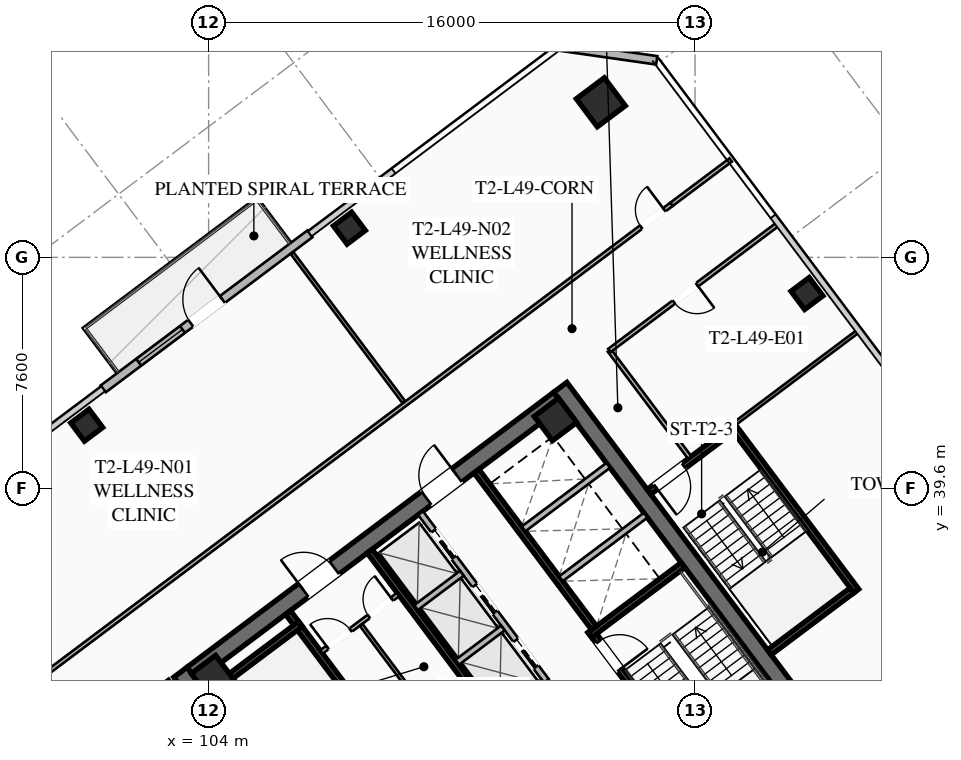
"""IFC4 building model, lengths in metres.
Left out: names, types, materials, properties, quantities, classifications, styles, units other than length and angle.
Written with IfcOpenShell. Run it as: python <this file> out.ifc"""

import sys

from ifc_helpers import new_model, si_unit, direction, frame, frame_2d, origin, origin_2d, place, context, subcontext, project, spatial, rectangle, hollow_rectangle, extrude, element, fill, save


model = new_model("IFC4")
c1 = context("Model", 3, precision=1e-05, world=origin(), true_north=direction((0.0, 1.0)))
c2 = subcontext(c1, "Body", "Model", "MODEL_VIEW")
j1 = project(units=[si_unit("LENGTHUNIT", "METRE"), si_unit("PLANEANGLEUNIT", "RADIAN")], contexts=[c1])
p1 = place(None, origin())
s1 = spatial("IfcSite", under=j1, at=p1, CompositionType="ELEMENT")
p2 = place(p1, origin())
s2 = spatial("IfcBuilding", under=s1, at=p2, CompositionType="ELEMENT")
p3 = place(p2, frame((0.0, 0.0, 181.85)))
s3 = spatial("IfcBuildingStorey", under=s2, at=p3, CompositionType="ELEMENT", Elevation=181.85)
for number, where, z_axis, x_axis in (
    (1, (112.436, 21.077, 0.0), (0.0, 0.0, 1.0), (-0.6, 0.8, 0.0)),
    (2, (115.564, 42.923, 0.0), (0.0, 0.0, 1.0), (0.6, -0.8, 0.0)),
):
    element("IfcWall", number, at=place(p3, frame(where, z_axis=z_axis, x_axis=x_axis)), inside=s3, PredefinedType="SHEAR", context=c2, shape_type="SweptSolid", body=[
        extrude(rectangle(XDim=15.6, YDim=0.55, at=frame_2d((7.8, 0.0))), origin(), (0.0, 0.0, 1.0), 3.55),
    ])
p4 = place(p3, frame((103.461, 33.502, 0.0), z_axis=(0.0, 0.0, 1.0), x_axis=(0.799998054672, 0.600002593761, 0.0)))
e3 = element("IfcWall", 3, at=p4, inside=s3, PredefinedType="SHEAR", context=c2, shape_type="SweptSolid", body=[
    extrude(rectangle(XDim=15.06, YDim=0.55, at=frame_2d((7.53, 0.0))), origin(), (0.0, 0.0, 1.0), 3.55),
])
p5 = place(p4, frame((4.58, 0.0, 0.0)))
e4 = element("IfcOpeningElement", 4, at=p5, cuts=e3, PredefinedType="OPENING", context=c2, shape_type="SweptSolid", body=[
    extrude(rectangle(XDim=1.25, YDim=2.25, at=frame_2d((0.625, 1.125))), frame((0.0, 0.285, 0.0), z_axis=(0.0, -1.0, 0.0), x_axis=(1.0, 0.0, 0.0)), (0.0, 0.0, 1.0), 0.57),
])
p6 = place(p4, frame((9.63, 0.0, 0.0)))
e5 = element("IfcOpeningElement", 5, at=p6, cuts=e3, PredefinedType="OPENING", context=c2, shape_type="SweptSolid", body=[
    extrude(rectangle(XDim=1.25, YDim=2.25, at=frame_2d((0.625, 1.125))), frame((0.0, 0.285, 0.0), z_axis=(0.0, -1.0, 0.0), x_axis=(1.0, 0.0, 0.0)), (0.0, 0.0, 1.0), 0.57),
])
for number, where, z_axis, x_axis in (
    (6, (115.41, 41.87, 0.0), (0.0, 0.0, 1.0), (0.8, 0.6, 0.0)),
    (7, (104.13, 33.41, 0.0), (0.0, 0.0, 1.0), (0.8, 0.6, 0.0)),
):
    element("IfcColumn", number, at=place(p3, frame(where, z_axis=z_axis, x_axis=x_axis)), inside=s3, PredefinedType="COLUMN", context=c2, shape_type="SweptSolid", body=[
        extrude(hollow_rectangle(XDim=1.0, YDim=1.0, WallThickness=0.04, at=origin_2d()), origin(), (0.0, 0.0, 1.0), 3.37),
    ])
p7 = place(p3, frame((116.9, 52.3, 0.0), z_axis=(0.0, 0.0, 1.0), x_axis=(0.799999996291, 0.600000004945, 0.0)))
e8 = element("IfcColumn", 8, at=p7, inside=s3, PredefinedType="COLUMN", context=c2, shape_type="SweptSolid", body=[
    extrude(hollow_rectangle(XDim=1.15, YDim=1.15, WallThickness=0.045, at=origin_2d()), origin(), (0.0, 0.0, 1.0), 3.37),
])
for number, where, z_axis, x_axis in (
    (9, (123.68, 46.01, 0.0), (0.0, 0.0, 1.0), (0.8, 0.6, 0.0)),
    (10, (108.63, 48.16, 0.0), (0.0, 0.0, 1.0), (0.8, 0.6, 0.0)),
    (11, (99.99, 41.68, 0.0), (0.0, 0.0, 1.0), (0.8, 0.6, 0.0)),
):
    element("IfcColumn", number, at=place(p3, frame(where, z_axis=z_axis, x_axis=x_axis)), inside=s3, PredefinedType="COLUMN", context=c2, shape_type="SweptSolid", body=[
        extrude(hollow_rectangle(XDim=0.75, YDim=0.75, WallThickness=0.032, at=origin_2d()), origin(), (0.0, 0.0, 1.0), 3.37),
    ])
p8 = place(p3, frame((100.532, 42.874, 0.0), z_axis=(0.0, 0.0, 1.0), x_axis=(0.799996553335, 0.600004595526, 0.0)))
e12 = element("IfcWall", 12, at=p8, inside=s3, PredefinedType="SOLIDWALL", context=c2, shape_type="SweptSolid", body=[
    extrude(rectangle(XDim=8.5, YDim=0.28, at=frame_2d((4.25, 0.0))), origin(), (0.0, 0.0, 1.0), 3.37),
])
p9 = place(p8, frame((3.6, 0.0, 0.0)))
e13 = element("IfcOpeningElement", 13, at=p9, cuts=e12, PredefinedType="OPENING", context=c2, shape_type="SweptSolid", body=[
    extrude(rectangle(XDim=1.3, YDim=2.15, at=frame_2d((0.65, 1.075))), frame((0.0, 0.15, 0.0), z_axis=(0.0, -1.0, 0.0), x_axis=(1.0, 0.0, 0.0)), (0.0, 0.0, 1.0), 0.3),
])
p10 = place(p8, frame((1.46, 0.0, 0.85)))
e14 = element("IfcOpeningElement", 14, at=p10, cuts=e12, PredefinedType="OPENING", context=c2, shape_type="SweptSolid", body=[
    extrude(rectangle(XDim=1.8, YDim=1.92, at=frame_2d((0.9, 0.96))), frame((0.0, 0.15, 0.0), z_axis=(0.0, -1.0, 0.0), x_axis=(1.0, 0.0, 0.0)), (0.0, 0.0, 1.0), 0.3),
])
p11 = place(p3, frame((115.52, 54.14, 0.0), z_axis=(0.0, 0.0, 1.0), x_axis=(0.989950994782, -0.141410847992, 0.0)))
e15 = element("IfcWall", 15, at=p11, inside=s3, PredefinedType="SOLIDWALL", context=c2, shape_type="SweptSolid", body=[
    extrude(rectangle(XDim=3.253, YDim=0.28, at=frame_2d((1.626, 0.0))), origin(), (0.0, 0.0, 1.0), 3.37),
])
p12 = place(p3, frame((111.44, 29.08, 0.0), z_axis=(0.0, 0.0, 1.0), x_axis=(-0.59999029481, 0.8000072788, 0.0)))
e16 = element("IfcWall", 16, at=p12, inside=s3, PredefinedType="SHEAR", context=c2, shape_type="SweptSolid", body=[
    extrude(rectangle(XDim=8.05, YDim=0.2, at=frame_2d((4.025, 0.0))), origin(), (0.0, 0.0, 1.0), 3.37),
])
p13 = place(p12, frame((0.45, 0.0, 0.0)))
e17 = element("IfcOpeningElement", 17, at=p13, cuts=e16, PredefinedType="OPENING", context=c2, shape_type="SweptSolid", body=[
    extrude(rectangle(XDim=1.15, YDim=2.2, at=frame_2d((0.575, 1.1))), frame((0.0, 0.11, 0.0), z_axis=(0.0, -1.0, 0.0), x_axis=(1.0, 0.0, 0.0)), (0.0, 0.0, 1.0), 0.22),
])
p14 = place(p3, frame((103.956, 32.842, 0.0), z_axis=(0.0, 0.0, 1.0), x_axis=(0.800015298837, 0.599979601008, 0.0)))
e18 = element("IfcWall", 18, at=p14, inside=s3, PredefinedType="SHEAR", context=c2, shape_type="SweptSolid", body=[
    extrude(rectangle(XDim=3.83, YDim=0.2, at=frame_2d((1.915, 0.0))), origin(), (0.0, 0.0, 1.0), 3.37),
])
p15 = place(p3, frame((116.56, 34.92, 0.0), z_axis=(0.0, 0.0, 1.0), x_axis=(0.59999029481, -0.8000072788, 0.0)))
e19 = element("IfcWall", 19, at=p15, inside=s3, PredefinedType="SHEAR", context=c2, shape_type="SweptSolid", body=[
    extrude(rectangle(XDim=8.05, YDim=0.2, at=frame_2d((4.025, 0.0))), origin(), (0.0, 0.0, 1.0), 3.37),
])
p16 = place(p15, frame((0.45, 0.0, 0.0)))
e20 = element("IfcOpeningElement", 20, at=p16, cuts=e19, PredefinedType="OPENING", context=c2, shape_type="SweptSolid", body=[
    extrude(rectangle(XDim=1.15, YDim=2.2, at=frame_2d((0.575, 1.1))), frame((0.0, 0.11, 0.0), z_axis=(0.0, -1.0, 0.0), x_axis=(1.0, 0.0, 0.0)), (0.0, 0.0, 1.0), 0.22),
])
p17 = place(p3, frame((116.54, 34.78, 0.0), z_axis=(0.0, 0.0, 1.0), x_axis=(0.800015298837, 0.599979601008, 0.0)))
e21 = element("IfcWall", 21, at=p17, inside=s3, PredefinedType="SHEAR", context=c2, shape_type="SweptSolid", body=[
    extrude(rectangle(XDim=3.83, YDim=0.2, at=frame_2d((1.915, 0.0))), origin(), (0.0, 0.0, 1.0), 3.37),
])
p18 = place(p3, frame((117.998, 25.936, 0.0), z_axis=(0.0, 0.0, 1.0), x_axis=(-0.600002693989, 0.799997979501, 0.0)))
e22 = element("IfcWall", 22, at=p18, inside=s3, PredefinedType="SHEAR", context=c2, shape_type="SweptSolid", body=[
    extrude(rectangle(XDim=14.5, YDim=0.2, at=frame_2d((7.25, 0.0))), origin(), (0.0, 0.0, 1.0), 3.37),
])
p19 = place(p3, frame((112.81, 40.17, 0.0), z_axis=(0.0, 0.0, 1.0), x_axis=(0.599993943644, -0.800004542231, 0.0)))
e23 = element("IfcWall", 23, at=p19, inside=s3, PredefinedType="SHEAR", context=c2, shape_type="SweptSolid", body=[
    extrude(rectangle(XDim=6.45, YDim=0.2, at=frame_2d((3.225, 0.0))), origin(), (0.0, 0.0, 1.0), 3.37),
])
for number, where, z_axis, x_axis in (
    (24, (115.59, 36.63, 0.0), (0.0, 0.0, 1.0), (0.8, 0.6, 0.0)),
    (25, (114.36, 38.27, 0.0), (0.0, 0.0, 1.0), (0.8, 0.6, 0.0)),
):
    element("IfcWall", number, at=place(p3, frame(where, z_axis=z_axis, x_axis=x_axis)), inside=s3, PredefinedType="SOLIDWALL", context=c2, shape_type="SweptSolid", body=[
        extrude(rectangle(XDim=3.48, YDim=0.2, at=frame_2d((1.74, 0.0))), origin(), (0.0, 0.0, 1.0), 3.37),
    ])
p20 = place(p3, frame((107.71, 34.22, 0.0), z_axis=(0.0, 0.0, 1.0), x_axis=(0.799981399002, 0.60002480053, 0.0)))
e26 = element("IfcWall", 26, at=p20, inside=s3, PredefinedType="PARTITIONING", context=c2, shape_type="SweptSolid", body=[
    extrude(rectangle(XDim=3.15, YDim=0.135, at=frame_2d((1.575, 0.0))), origin(), (0.0, 0.0, 1.0), 2.723),
])
p21 = place(p20, frame((0.25, 0.0, 0.0)))
e27 = element("IfcOpeningElement", 27, at=p21, cuts=e26, PredefinedType="OPENING", context=c2, shape_type="SweptSolid", body=[
    extrude(rectangle(XDim=0.95, YDim=2.05, at=frame_2d((0.475, 1.025))), frame((0.0, 0.077, 0.0), z_axis=(0.0, -1.0, 0.0), x_axis=(1.0, 0.0, 0.0)), (0.0, 0.0, 1.0), 0.155),
])
p22 = place(p20, frame((1.95, 0.0, 0.0)))
e28 = element("IfcOpeningElement", 28, at=p22, cuts=e26, PredefinedType="OPENING", context=c2, shape_type="SweptSolid", body=[
    extrude(rectangle(XDim=0.95, YDim=2.05, at=frame_2d((0.475, 1.025))), frame((0.0, 0.077, 0.0), z_axis=(0.0, -1.0, 0.0), x_axis=(1.0, 0.0, 0.0)), (0.0, 0.0, 1.0), 0.155),
])
p23 = place(p3, frame((111.296, 32.072, 0.0), z_axis=(0.0, 0.0, 1.0), x_axis=(-0.59995887973, 0.800030838552, 0.0)))
e29 = element("IfcWall", 29, at=p23, inside=s3, PredefinedType="PARTITIONING", context=c2, shape_type="SweptSolid", body=[
    extrude(rectangle(XDim=3.8, YDim=0.11, at=frame_2d((1.9, 0.0))), origin(), (0.0, 0.0, 1.0), 2.723),
])
p24 = place(p3, frame((115.11, 33.27, 0.0), z_axis=(0.0, 0.0, 1.0), x_axis=(-0.600011322243, 0.799991508192, 0.0)))
e30 = element("IfcWall", 30, at=p24, inside=s3, PredefinedType="SOLIDWALL", context=c2, shape_type="SweptSolid", body=[
    extrude(rectangle(XDim=6.9, YDim=0.2, at=frame_2d((3.45, 0.0))), origin(), (0.0, 0.0, 1.0), 3.37),
])
p25 = place(p24, frame((0.575, 0.0, 0.0)))
e31 = element("IfcOpeningElement", 31, at=p25, cuts=e30, PredefinedType="OPENING", context=c2, shape_type="SweptSolid", body=[
    extrude(rectangle(XDim=1.1, YDim=2.2, at=frame_2d((0.55, 1.1))), frame((0.0, 0.11, 0.0), z_axis=(0.0, -1.0, 0.0), x_axis=(1.0, 0.0, 0.0)), (0.0, 0.0, 1.0), 0.22),
])
p26 = place(p24, frame((2.825, 0.0, 0.0)))
e32 = element("IfcOpeningElement", 32, at=p26, cuts=e30, PredefinedType="OPENING", context=c2, shape_type="SweptSolid", body=[
    extrude(rectangle(XDim=1.1, YDim=2.2, at=frame_2d((0.55, 1.1))), frame((0.0, 0.11, 0.0), z_axis=(0.0, -1.0, 0.0), x_axis=(1.0, 0.0, 0.0)), (0.0, 0.0, 1.0), 0.22),
])
p27 = place(p24, frame((5.075, 0.0, 0.0)))
e33 = element("IfcOpeningElement", 33, at=p27, cuts=e30, PredefinedType="OPENING", context=c2, shape_type="SweptSolid", body=[
    extrude(rectangle(XDim=1.1, YDim=2.2, at=frame_2d((0.55, 1.1))), frame((0.0, 0.11, 0.0), z_axis=(0.0, -1.0, 0.0), x_axis=(1.0, 0.0, 0.0)), (0.0, 0.0, 1.0), 0.22),
])
p28 = place(p3, frame((112.176, 33.882, 0.0), z_axis=(0.0, 0.0, 1.0), x_axis=(0.8, 0.6, 0.0)))
e34 = element("IfcWall", 34, at=p28, inside=s3, PredefinedType="SOLIDWALL", context=c2, shape_type="SweptSolid", body=[
    extrude(rectangle(XDim=1.88, YDim=0.2, at=frame_2d((0.94, 0.0))), origin(), (0.0, 0.0, 1.0), 3.37),
])
p29 = place(p3, frame((110.826, 35.682, 0.0), z_axis=(0.0, 0.0, 1.0), x_axis=(0.799984418148, 0.600020775241, 0.0)))
e35 = element("IfcWall", 35, at=p29, inside=s3, PredefinedType="SOLIDWALL", context=c2, shape_type="SweptSolid", body=[
    extrude(rectangle(XDim=1.88, YDim=0.2, at=frame_2d((0.94, 0.0))), origin(), (0.0, 0.0, 1.0), 3.37),
])
p30 = place(p3, frame((125.304, 36.228, 0.0), z_axis=(0.0, 0.0, 1.0), x_axis=(-0.59998851072, 0.800008616831, 0.0)))
e36 = element("IfcWall", 36, at=p30, inside=s3, PredefinedType="SHEAR", context=c2, shape_type="SweptSolid", body=[
    extrude(rectangle(XDim=6.8, YDim=0.2, at=frame_2d((3.4, 0.0))), origin(), (0.0, 0.0, 1.0), 3.37),
])
p31 = place(p3, frame((121.204, 41.528, 0.0), z_axis=(0.0, 0.0, 1.0), x_axis=(-0.800017232136, -0.599977023131, 0.0)))
e37 = element("IfcWall", 37, at=p31, inside=s3, PredefinedType="SHEAR", context=c2, shape_type="SweptSolid", body=[
    extrude(rectangle(XDim=3.4, YDim=0.2, at=frame_2d((1.7, 0.0))), origin(), (0.0, 0.0, 1.0), 3.37),
])
p32 = place(p31, frame((1.975, 0.0, 0.0)))
e38 = element("IfcOpeningElement", 38, at=p32, cuts=e37, PredefinedType="OPENING", context=c2, shape_type="SweptSolid", body=[
    extrude(rectangle(XDim=1.15, YDim=2.2, at=frame_2d((0.575, 1.1))), frame((0.0, 0.11, 0.0), z_axis=(0.0, -1.0, 0.0), x_axis=(1.0, 0.0, 0.0)), (0.0, 0.0, 1.0), 0.22),
])
p33 = place(p3, frame((122.444, 34.208, 0.0), z_axis=(0.0, 0.0, 1.0), x_axis=(0.79999138319, 0.600011488909, 0.0)))
e39 = element("IfcWall", 39, at=p33, inside=s3, PredefinedType="SHEAR", context=c2, shape_type="SweptSolid", body=[
    extrude(rectangle(XDim=3.4, YDim=0.2, at=frame_2d((1.7, 0.0))), origin(), (0.0, 0.0, 1.0), 3.37),
])
p34 = place(p3, frame((119.824, 40.618, 0.0), z_axis=(0.0, 0.0, 1.0), x_axis=(-0.599982243973, 0.800013316712, 0.0)))
e40 = element("IfcWall", 40, at=p34, inside=s3, PredefinedType="PARTITIONING", context=c2, shape_type="SweptSolid", body=[
    extrude(rectangle(XDim=4.4, YDim=0.135, at=frame_2d((2.2, 0.0))), origin(), (0.0, 0.0, 1.0), 2.723),
])
p35 = place(p3, frame((96.268, 31.726, 0.0), z_axis=(0.0, 0.0, 1.0), x_axis=(0.8, 0.6, 0.0)))
e41 = element("IfcWall", 41, at=p35, inside=s3, PredefinedType="PARTITIONING", context=c2, shape_type="SweptSolid", body=[
    extrude(rectangle(XDim=28.7, YDim=0.135, at=frame_2d((14.35, 0.0))), origin(), (0.0, 0.0, 1.0), 2.723),
])
p36 = place(p35, frame((0.3, 0.0, 0.0)))
e42 = element("IfcOpeningElement", 42, at=p36, cuts=e41, PredefinedType="OPENING", context=c2, shape_type="SweptSolid", body=[
    extrude(rectangle(XDim=0.95, YDim=2.05, at=frame_2d((0.475, 1.025))), frame((0.0, 0.077, 0.0), z_axis=(0.0, -1.0, 0.0), x_axis=(1.0, 0.0, 0.0)), (0.0, 0.0, 1.0), 0.155),
])
p37 = place(p35, frame((27.45, 0.0, 0.0)))
e43 = element("IfcOpeningElement", 43, at=p37, cuts=e41, PredefinedType="OPENING", context=c2, shape_type="SweptSolid", body=[
    extrude(rectangle(XDim=0.95, YDim=2.05, at=frame_2d((0.475, 1.025))), frame((0.0, 0.077, 0.0), z_axis=(0.0, -1.0, 0.0), x_axis=(1.0, 0.0, 0.0)), (0.0, 0.0, 1.0), 0.155),
])
p38 = place(p3, frame((119.228, 48.946, 0.0), z_axis=(0.0, 0.0, 1.0), x_axis=(0.800012055778, 0.599983925293, 0.0)))
e44 = element("IfcWall", 44, at=p38, inside=s3, PredefinedType="PARTITIONING", context=c2, shape_type="SweptSolid", body=[
    extrude(rectangle(XDim=2.43, YDim=0.135, at=frame_2d((1.215, 0.0))), origin(), (0.0, 0.0, 1.0), 2.723),
])
p39 = place(p3, frame((110.42, 42.44, 0.0), z_axis=(0.0, 0.0, 1.0), x_axis=(-0.599993627662, 0.800004779214, 0.0)))
e45 = element("IfcWall", 45, at=p39, inside=s3, PredefinedType="PARTITIONING", context=c2, shape_type="SweptSolid", body=[
    extrude(rectangle(XDim=6.13, YDim=0.11, at=frame_2d((3.065, 0.0))), origin(), (0.0, 0.0, 1.0), 2.723),
])
p40 = place(p3, frame((122.744, 48.308, 0.0), z_axis=(0.0, 0.0, 1.0), x_axis=(-0.79997892247, -0.600028102345, 0.0)))
e46 = element("IfcWall", 46, at=p40, inside=s3, PredefinedType="PARTITIONING", context=c2, shape_type="SweptSolid", body=[
    extrude(rectangle(XDim=6.95, YDim=0.135, at=frame_2d((3.475, 0.0))), origin(), (0.0, 0.0, 1.0), 2.723),
])
p41 = place(p40, frame((3.35, 0.0, 0.0)))
e47 = element("IfcOpeningElement", 47, at=p41, cuts=e46, PredefinedType="OPENING", context=c2, shape_type="SweptSolid", body=[
    extrude(rectangle(XDim=0.95, YDim=2.05, at=frame_2d((0.475, 1.025))), frame((0.0, 0.077, 0.0), z_axis=(0.0, -1.0, 0.0), x_axis=(1.0, 0.0, 0.0)), (0.0, 0.0, 1.0), 0.155),
])
p42 = place(p3, frame((125.208, 30.656, 0.0), z_axis=(0.0, 0.0, 1.0), x_axis=(0.800006797429, 0.599990936654, 0.0)))
e48 = element("IfcWall", 48, at=p42, inside=s3, PredefinedType="PARTITIONING", context=c2, shape_type="SweptSolid", body=[
    extrude(rectangle(XDim=8.62, YDim=0.135, at=frame_2d((4.31, 0.0))), origin(), (0.0, 0.0, 1.0), 2.723),
])
p43 = place(p42, frame((2.045, 0.0, 0.0)))
e49 = element("IfcOpeningElement", 49, at=p43, cuts=e48, PredefinedType="OPENING", context=c2, shape_type="SweptSolid", body=[
    extrude(rectangle(XDim=0.95, YDim=2.05, at=frame_2d((0.475, 1.025))), frame((0.0, 0.077, 0.0), z_axis=(0.0, -1.0, 0.0), x_axis=(1.0, 0.0, 0.0)), (0.0, 0.0, 1.0), 0.155),
])
p44 = place(p3, frame((125.384, 44.788, 0.0), z_axis=(0.0, 0.0, 1.0), x_axis=(-0.8, -0.6, 0.0)))
e50 = element("IfcWall", 50, at=p44, inside=s3, PredefinedType="PARTITIONING", context=c2, shape_type="SweptSolid", body=[
    extrude(rectangle(XDim=5.1, YDim=0.11, at=frame_2d((2.55, 0.0))), origin(), (0.0, 0.0, 1.0), 2.723),
])
p45 = place(p3, frame((112.104, 20.928, 0.0), z_axis=(0.0, 0.0, 1.0), x_axis=(-0.599994940075, 0.800003794918, 0.0)))
e51 = element("IfcWall", 51, at=p45, inside=s3, PredefinedType="PARTITIONING", context=c2, shape_type="SweptSolid", body=[
    extrude(rectangle(XDim=15.44, YDim=0.135, at=frame_2d((7.72, 0.0))), origin(), (0.0, 0.0, 1.0), 2.723),
])
p46 = place(p3, frame((102.728, 33.296, 0.0), z_axis=(0.0, 0.0, 1.0), x_axis=(-0.800013722153, -0.59998170336, 0.0)))
e52 = element("IfcWall", 52, at=p46, inside=s3, PredefinedType="PARTITIONING", context=c2, shape_type="SweptSolid", body=[
    extrude(rectangle(XDim=8.54, YDim=0.135, at=frame_2d((4.27, 0.0))), origin(), (0.0, 0.0, 1.0), 2.723),
])
p47 = place(p46, frame((0.5, 0.0, 0.0)))
e53 = element("IfcOpeningElement", 53, at=p47, cuts=e52, PredefinedType="OPENING", context=c2, shape_type="SweptSolid", body=[
    extrude(rectangle(XDim=0.95, YDim=2.05, at=frame_2d((0.475, 1.025))), frame((0.0, 0.077, 0.0), z_axis=(0.0, -1.0, 0.0), x_axis=(1.0, 0.0, 0.0)), (0.0, 0.0, 1.0), 0.155),
])
p48 = place(p9, origin())
e54 = element("IfcDoor", 54, at=p48, inside=s3, OperationType="SINGLE_SWING_RIGHT", PredefinedType="DOOR", context=c2, shape_type="SweptSolid", body=[
    extrude(rectangle(XDim=1.3, YDim=2.15, at=frame_2d((0.65, 1.075))), frame((0.0, 0.025, 0.0), z_axis=(0.0, -1.0, 0.0), x_axis=(1.0, 0.0, 0.0)), (0.0, 0.0, 1.0), 0.05),
])
fill(e13, e54)
p49 = place(p10, origin())
e55 = element("IfcWindow", 55, at=p49, inside=s3, PartitioningType="SINGLE_PANEL", PredefinedType="WINDOW", context=c2, shape_type="SweptSolid", body=[
    extrude(rectangle(XDim=1.8, YDim=1.92, at=frame_2d((0.9, 0.96))), frame((0.0, 0.03, 0.0), z_axis=(0.0, -1.0, 0.0), x_axis=(1.0, 0.0, 0.0)), (0.0, 0.0, 1.0), 0.06),
])
fill(e14, e55)
p50 = place(p5, origin())
e56 = element("IfcDoor", 56, at=p50, inside=s3, OperationType="SINGLE_SWING_LEFT", PredefinedType="DOOR", context=c2, shape_type="SweptSolid", body=[
    extrude(rectangle(XDim=1.25, YDim=2.25, at=frame_2d((0.625, 1.125))), frame((0.0, 0.025, 0.0), z_axis=(0.0, -1.0, 0.0), x_axis=(1.0, 0.0, 0.0)), (0.0, 0.0, 1.0), 0.05),
])
fill(e4, e56)
p51 = place(p6, origin())
e57 = element("IfcDoor", 57, at=p51, inside=s3, OperationType="SINGLE_SWING_RIGHT", PredefinedType="DOOR", context=c2, shape_type="SweptSolid", body=[
    extrude(rectangle(XDim=1.25, YDim=2.25, at=frame_2d((0.625, 1.125))), frame((0.0, 0.025, 0.0), z_axis=(0.0, -1.0, 0.0), x_axis=(1.0, 0.0, 0.0)), (0.0, 0.0, 1.0), 0.05),
])
fill(e5, e57)
p52 = place(p16, origin())
e58 = element("IfcDoor", 58, at=p52, inside=s3, OperationType="SINGLE_SWING_RIGHT", PredefinedType="DOOR", context=c2, shape_type="SweptSolid", body=[
    extrude(rectangle(XDim=1.15, YDim=2.2, at=frame_2d((0.575, 1.1))), frame((0.0, 0.025, 0.0), z_axis=(0.0, -1.0, 0.0), x_axis=(1.0, 0.0, 0.0)), (0.0, 0.0, 1.0), 0.05),
])
fill(e20, e58)
p53 = place(p21, origin())
e59 = element("IfcDoor", 59, at=p53, inside=s3, OperationType="SINGLE_SWING_LEFT", PredefinedType="DOOR", context=c2, shape_type="SweptSolid", body=[
    extrude(rectangle(XDim=0.95, YDim=2.05, at=frame_2d((0.475, 1.025))), frame((0.0, 0.025, 0.0), z_axis=(0.0, -1.0, 0.0), x_axis=(1.0, 0.0, 0.0)), (0.0, 0.0, 1.0), 0.05),
])
fill(e27, e59)
p54 = place(p22, origin())
e60 = element("IfcDoor", 60, at=p54, inside=s3, OperationType="SINGLE_SWING_RIGHT", PredefinedType="DOOR", context=c2, shape_type="SweptSolid", body=[
    extrude(rectangle(XDim=0.95, YDim=2.05, at=frame_2d((0.475, 1.025))), frame((0.0, 0.025, 0.0), z_axis=(0.0, -1.0, 0.0), x_axis=(1.0, 0.0, 0.0)), (0.0, 0.0, 1.0), 0.05),
])
fill(e28, e60)
p55 = place(p32, origin())
e61 = element("IfcDoor", 61, at=p55, inside=s3, OperationType="SINGLE_SWING_RIGHT", PredefinedType="DOOR", context=c2, shape_type="SweptSolid", body=[
    extrude(rectangle(XDim=1.15, YDim=2.2, at=frame_2d((0.575, 1.1))), frame((0.0, 0.025, 0.0), z_axis=(0.0, -1.0, 0.0), x_axis=(1.0, 0.0, 0.0)), (0.0, 0.0, 1.0), 0.05),
])
fill(e38, e61)
p56 = place(p37, origin())
e62 = element("IfcDoor", 62, at=p56, inside=s3, OperationType="SINGLE_SWING_RIGHT", PredefinedType="DOOR", context=c2, shape_type="SweptSolid", body=[
    extrude(rectangle(XDim=0.95, YDim=2.05, at=frame_2d((0.475, 1.025))), frame((0.0, 0.025, 0.0), z_axis=(0.0, -1.0, 0.0), x_axis=(1.0, 0.0, 0.0)), (0.0, 0.0, 1.0), 0.05),
])
fill(e43, e62)
p57 = place(p41, origin())
e63 = element("IfcDoor", 63, at=p57, inside=s3, OperationType="SINGLE_SWING_LEFT", PredefinedType="DOOR", context=c2, shape_type="SweptSolid", body=[
    extrude(rectangle(XDim=0.95, YDim=2.05, at=frame_2d((0.475, 1.025))), frame((0.0, 0.025, 0.0), z_axis=(0.0, -1.0, 0.0), x_axis=(1.0, 0.0, 0.0)), (0.0, 0.0, 1.0), 0.05),
])
fill(e47, e63)
p58 = place(p25, origin())
e64 = element("IfcDoor", 64, at=p58, inside=s3, OperationType="SLIDING_TO_LEFT", PredefinedType="DOOR", context=c2, shape_type="SweptSolid", body=[
    extrude(rectangle(XDim=1.1, YDim=2.2, at=frame_2d((0.55, 1.1))), frame((0.0, 0.025, 0.0), z_axis=(0.0, -1.0, 0.0), x_axis=(1.0, 0.0, 0.0)), (0.0, 0.0, 1.0), 0.05),
])
fill(e31, e64)
p59 = place(p26, origin())
e65 = element("IfcDoor", 65, at=p59, inside=s3, OperationType="SLIDING_TO_LEFT", PredefinedType="DOOR", context=c2, shape_type="SweptSolid", body=[
    extrude(rectangle(XDim=1.1, YDim=2.2, at=frame_2d((0.55, 1.1))), frame((0.0, 0.025, 0.0), z_axis=(0.0, -1.0, 0.0), x_axis=(1.0, 0.0, 0.0)), (0.0, 0.0, 1.0), 0.05),
])
fill(e32, e65)
p60 = place(p27, origin())
e66 = element("IfcDoor", 66, at=p60, inside=s3, OperationType="SLIDING_TO_LEFT", PredefinedType="DOOR", context=c2, shape_type="SweptSolid", body=[
    extrude(rectangle(XDim=1.1, YDim=2.2, at=frame_2d((0.55, 1.1))), frame((0.0, 0.025, 0.0), z_axis=(0.0, -1.0, 0.0), x_axis=(1.0, 0.0, 0.0)), (0.0, 0.0, 1.0), 0.05),
])
fill(e33, e66)
save(model, sys.argv[1])
